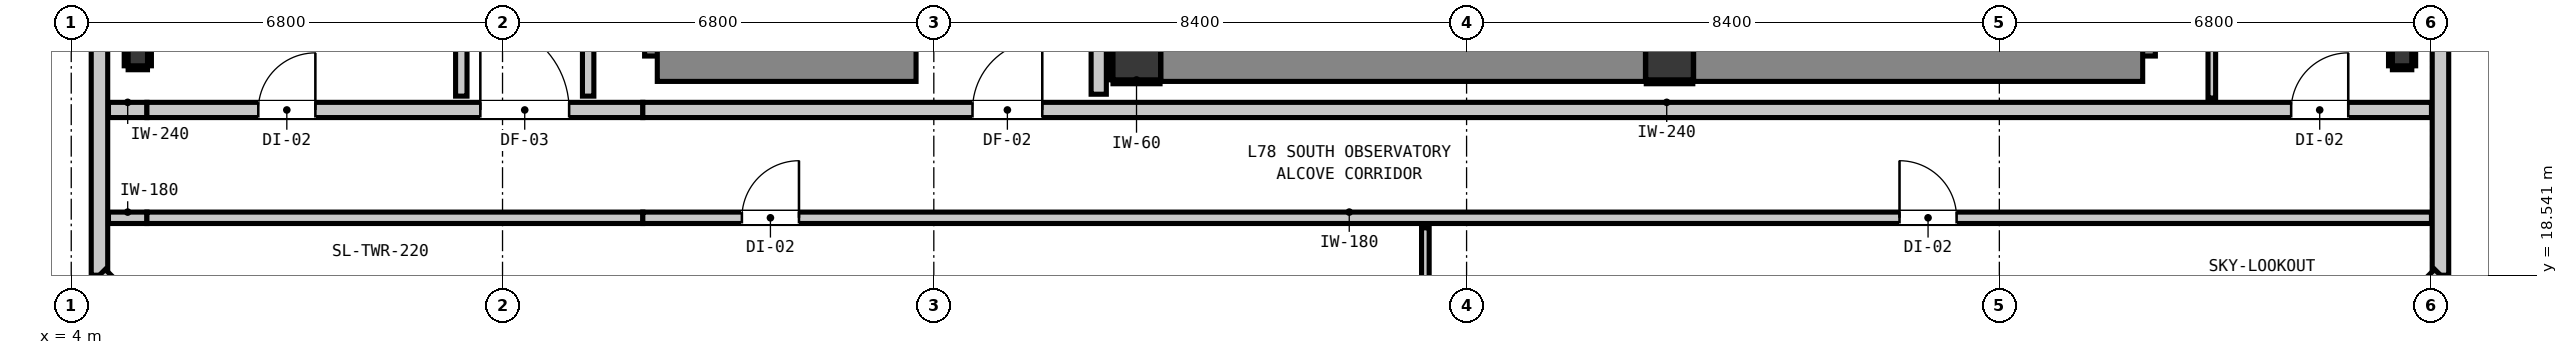
"""IFC4 building model, lengths in metres.
Left out: names, types, materials, properties, quantities, classifications, styles, units other than length and angle.
Written with IfcOpenShell. Run it as: python <this file> out.ifc"""

import sys

from ifc_helpers import new_model, si_unit, direction, frame, frame_2d, origin, origin_2d, place, context, subcontext, project, spatial, rectangle, i_section, extrude, element, fill, save


model = new_model("IFC4")
c1 = context("Model", 3, precision=1e-05, world=origin(), true_north=direction((0.0, 1.0)))
c2 = subcontext(c1, "Body", "Model", "MODEL_VIEW")
j1 = project(units=[si_unit("LENGTHUNIT", "METRE"), si_unit("PLANEANGLEUNIT", "RADIAN")], contexts=[c1])
p1 = place(None, origin())
s1 = spatial("IfcSite", under=j1, at=p1, CompositionType="ELEMENT")
p2 = place(p1, origin())
s2 = spatial("IfcBuilding", under=s1, at=p2, CompositionType="ELEMENT")
p3 = place(p2, frame((0.0, 0.0, 268.88)))
s3 = spatial("IfcBuildingStorey", under=s2, at=p3, CompositionType="ELEMENT", Elevation=268.88)
for number, where, z_axis, x_axis in (
    (1, (20.8, 22.0, 0.0), (0.0, 0.0, 1.0), (1.0, 0.0, 0.0)),
    (2, (29.2, 22.0, 0.0), (0.0, 0.0, 1.0), (1.0, 0.0, 0.0)),
):
    element("IfcColumn", number, at=place(p3, frame(where, z_axis=z_axis, x_axis=x_axis)), inside=s3, PredefinedType="COLUMN", context=c2, shape_type="SweptSolid", body=[
        extrude(rectangle(XDim=0.75, YDim=0.75, at=origin_2d()), origin(), (0.0, 0.0, 1.0), 4.6),
    ])
p4 = place(p3, frame((13.44, 22.0, 0.0), z_axis=(0.0, 0.0, 1.0), x_axis=(0.0, 1.0, 0.0)))
e3 = element("IfcWall", 3, at=p4, inside=s3, PredefinedType="SHEAR", context=c2, shape_type="SweptSolid", body=[
    extrude(rectangle(XDim=8.32, YDim=0.8, at=frame_2d((4.16, 0.0))), origin(), (0.0, 0.0, 1.0), 4.6),
])
p5 = place(p3, frame((13.24, 22.0, 0.0), z_axis=(0.0, 0.0, 1.0), x_axis=(1.0, 0.0, 0.0)))
e4 = element("IfcWall", 4, at=p5, inside=s3, PredefinedType="SHEAR", context=c2, shape_type="SweptSolid", body=[
    extrude(rectangle(XDim=4.08, YDim=0.8, at=frame_2d((2.04, 0.0))), origin(), (0.0, 0.0, 1.0), 4.6),
])
p6 = place(p3, frame((36.46, 22.0, 0.0), z_axis=(0.0, 0.0, 1.0), x_axis=(0.0, 1.0, 0.0)))
e5 = element("IfcWall", 5, at=p6, inside=s3, PredefinedType="SHEAR", context=c2, shape_type="SweptSolid", body=[
    extrude(rectangle(XDim=8.32, YDim=0.8, at=frame_2d((4.16, 0.0))), origin(), (0.0, 0.0, 1.0), 4.6),
])
p7 = place(p3, frame((29.58, 22.0, 0.0), z_axis=(0.0, 0.0, 1.0), x_axis=(1.0, 0.0, 0.0)))
e6 = element("IfcWall", 6, at=p7, inside=s3, PredefinedType="SHEAR", context=c2, shape_type="SweptSolid", body=[
    extrude(rectangle(XDim=7.08, YDim=0.8, at=frame_2d((3.54, 0.0))), origin(), (0.0, 0.0, 1.0), 4.6),
])
p8 = place(p3, frame((21.18, 22.0, 0.0), z_axis=(0.0, 0.0, 1.0), x_axis=(1.0, 0.0, 0.0)))
e7 = element("IfcWall", 7, at=p8, inside=s3, PredefinedType="SHEAR", context=c2, shape_type="SweptSolid", body=[
    extrude(rectangle(XDim=7.64, YDim=0.8, at=frame_2d((3.82, 0.0))), origin(), (0.0, 0.0, 1.0), 4.6),
])
for number, where, z_axis, x_axis in (
    (8, (5.05, 22.0, 0.0), (0.0, 0.0, 1.0), (1.0, 0.0, 0.0)),
    (9, (40.75, 22.0, 0.0), (0.0, 0.0, 1.0), (1.0, 0.0, 0.0)),
):
    element("IfcColumn", number, at=place(p3, frame(where, z_axis=z_axis, x_axis=x_axis)), inside=s3, PredefinedType="COLUMN", context=c2, shape_type="SweptSolid", body=[
        extrude(i_section(OverallWidth=0.305, OverallDepth=0.308, WebThickness=0.01, FlangeThickness=0.015, at=origin_2d()), origin(), (0.0, 0.0, 1.0), 4.6),
    ])
p9 = place(p3, frame((4.445, 18.545, 0.0), z_axis=(0.0, 0.0, 1.0), x_axis=(0.0, 1.0, 0.0)))
e10 = element("IfcWall", 10, at=p9, inside=s3, PredefinedType="STANDARD", context=c2, shape_type="SweptSolid", body=[
    extrude(rectangle(XDim=30.31, YDim=0.26, at=frame_2d((15.155, 0.0))), origin(), (0.0, 0.0, 1.0), 4.38),
])
p10 = place(p9, frame((26.038, 0.0, 0.85)))
e11 = element("IfcOpeningElement", 11, at=p10, cuts=e10, PredefinedType="OPENING", context=c2, shape_type="SweptSolid", body=[
    extrude(rectangle(XDim=1.65, YDim=1.75, at=frame_2d((0.825, 0.875))), frame((0.0, 0.14, 0.0), z_axis=(0.0, -1.0, 0.0), x_axis=(1.0, 0.0, 0.0)), (0.0, 0.0, 1.0), 0.28),
])
p11 = place(p3, frame((41.355, 48.855, 0.0), z_axis=(0.0, 0.0, 1.0), x_axis=(0.0, -1.0, 0.0)))
e12 = element("IfcWall", 12, at=p11, inside=s3, PredefinedType="STANDARD", context=c2, shape_type="SweptSolid", body=[
    extrude(rectangle(XDim=30.31, YDim=0.26, at=frame_2d((15.155, 0.0))), origin(), (0.0, 0.0, 1.0), 4.38),
])
p12 = place(p11, frame((2.622, 0.0, 0.85)))
e13 = element("IfcOpeningElement", 13, at=p12, cuts=e12, PredefinedType="OPENING", context=c2, shape_type="SweptSolid", body=[
    extrude(rectangle(XDim=1.65, YDim=1.75, at=frame_2d((0.825, 0.875))), frame((0.0, 0.14, 0.0), z_axis=(0.0, -1.0, 0.0), x_axis=(1.0, 0.0, 0.0)), (0.0, 0.0, 1.0), 0.28),
])
p13 = place(p11, frame((22.103, 0.0, 0.85)))
e14 = element("IfcOpeningElement", 14, at=p13, cuts=e12, PredefinedType="OPENING", context=c2, shape_type="SweptSolid", body=[
    extrude(rectangle(XDim=1.65, YDim=1.75, at=frame_2d((0.825, 0.875))), frame((0.0, 0.14, 0.0), z_axis=(0.0, -1.0, 0.0), x_axis=(1.0, 0.0, 0.0)), (0.0, 0.0, 1.0), 0.28),
])
p14 = place(p11, frame((12.98, 0.0, 0.85)))
e15 = element("IfcOpeningElement", 15, at=p14, cuts=e12, PredefinedType="OPENING", context=c2, shape_type="SweptSolid", body=[
    extrude(rectangle(XDim=1.65, YDim=1.75, at=frame_2d((0.825, 0.875))), frame((0.0, 0.14, 0.0), z_axis=(0.0, -1.0, 0.0), x_axis=(1.0, 0.0, 0.0)), (0.0, 0.0, 1.0), 0.28),
])
for number, where, z_axis, x_axis in (
    (16, (41.355, 18.545, 0.0), (0.0, 0.0, 1.0), (-0.707, -0.707, 0.0)),
    (17, (6.545, 16.445, 0.0), (0.0, 0.0, 1.0), (-0.707, 0.707, 0.0)),
):
    element("IfcWall", number, at=place(p3, frame(where, z_axis=z_axis, x_axis=x_axis)), inside=s3, PredefinedType="STANDARD", context=c2, shape_type="SweptSolid", body=[
        extrude(rectangle(XDim=2.97, YDim=0.26, at=frame_2d((1.485, 0.0))), origin(), (0.0, 0.0, 1.0), 4.38),
    ])
p15 = place(p3, frame((4.587, 21.15, 0.0), z_axis=(0.0, 0.0, 1.0), x_axis=(1.0, 0.0, 0.0)))
e18 = element("IfcWall", 18, at=p15, inside=s3, PredefinedType="PARTITIONING", context=c2, shape_type="SweptSolid", body=[
    extrude(rectangle(XDim=0.606, YDim=0.24, at=frame_2d((0.303, 0.0))), origin(), (0.0, 0.0, 1.0), 4.38),
])
p16 = place(p3, frame((5.193, 21.15, 0.0), z_axis=(0.0, 0.0, 1.0), x_axis=(1.0, 0.0, 0.0)))
e19 = element("IfcWall", 19, at=p16, inside=s3, PredefinedType="PARTITIONING", context=c2, shape_type="SweptSolid", body=[
    extrude(rectangle(XDim=7.819, YDim=0.24, at=frame_2d((3.909, 0.0))), origin(), (0.0, 0.0, 1.0), 3.757),
])
p17 = place(p16, frame((5.257, 0.0, 0.0)))
e20 = element("IfcOpeningElement", 20, at=p17, cuts=e19, PredefinedType="OPENING", context=c2, shape_type="SweptSolid", body=[
    extrude(rectangle(XDim=1.4, YDim=2.15, at=frame_2d((0.7, 1.075))), frame((0.0, 0.13, 0.0), z_axis=(0.0, -1.0, 0.0), x_axis=(1.0, 0.0, 0.0)), (0.0, 0.0, 1.0), 0.26),
])
p18 = place(p16, frame((1.756, 0.0, 0.0)))
e21 = element("IfcOpeningElement", 21, at=p18, cuts=e19, PredefinedType="OPENING", context=c2, shape_type="SweptSolid", body=[
    extrude(rectangle(XDim=0.9, YDim=2.1, at=frame_2d((0.45, 1.05))), frame((0.0, 0.13, 0.0), z_axis=(0.0, -1.0, 0.0), x_axis=(1.0, 0.0, 0.0)), (0.0, 0.0, 1.0), 0.26),
])
p19 = place(p3, frame((13.012, 21.15, 0.0), z_axis=(0.0, 0.0, 1.0), x_axis=(1.0, 0.0, 0.0)))
e22 = element("IfcWall", 22, at=p19, inside=s3, PredefinedType="PARTITIONING", context=c2, shape_type="SweptSolid", body=[
    extrude(rectangle(XDim=28.201, YDim=0.24, at=frame_2d((14.101, 0.0))), origin(), (0.0, 0.0, 1.0), 4.38),
])
p20 = place(p19, frame((5.198, 0.0, 0.0)))
e23 = element("IfcOpeningElement", 23, at=p20, cuts=e22, PredefinedType="OPENING", context=c2, shape_type="SweptSolid", body=[
    extrude(rectangle(XDim=1.1, YDim=2.15, at=frame_2d((0.55, 1.075))), frame((0.0, 0.13, 0.0), z_axis=(0.0, -1.0, 0.0), x_axis=(1.0, 0.0, 0.0)), (0.0, 0.0, 1.0), 0.26),
])
p21 = place(p19, frame((25.989, 0.0, 0.0)))
e24 = element("IfcOpeningElement", 24, at=p21, cuts=e22, PredefinedType="OPENING", context=c2, shape_type="SweptSolid", body=[
    extrude(rectangle(XDim=0.9, YDim=2.1, at=frame_2d((0.45, 1.05))), frame((0.0, 0.13, 0.0), z_axis=(0.0, -1.0, 0.0), x_axis=(1.0, 0.0, 0.0)), (0.0, 0.0, 1.0), 0.26),
])
p22 = place(p3, frame((4.587, 19.45, 0.0), z_axis=(0.0, 0.0, 1.0), x_axis=(1.0, 0.0, 0.0)))
e25 = element("IfcWall", 25, at=p22, inside=s3, PredefinedType="PARTITIONING", context=c2, shape_type="SweptSolid", body=[
    extrude(rectangle(XDim=0.606, YDim=0.18, at=frame_2d((0.303, 0.0))), origin(), (0.0, 0.0, 1.0), 4.38),
])
p23 = place(p3, frame((5.193, 19.45, 0.0), z_axis=(0.0, 0.0, 1.0), x_axis=(1.0, 0.0, 0.0)))
e26 = element("IfcWall", 26, at=p23, inside=s3, PredefinedType="PARTITIONING", context=c2, shape_type="SweptSolid", body=[
    extrude(rectangle(XDim=7.819, YDim=0.18, at=frame_2d((3.909, 0.0))), origin(), (0.0, 0.0, 1.0), 3.757),
])
p24 = place(p3, frame((13.012, 19.45, 0.0), z_axis=(0.0, 0.0, 1.0), x_axis=(1.0, 0.0, 0.0)))
e27 = element("IfcWall", 27, at=p24, inside=s3, PredefinedType="PARTITIONING", context=c2, shape_type="SweptSolid", body=[
    extrude(rectangle(XDim=28.201, YDim=0.18, at=frame_2d((14.101, 0.0))), origin(), (0.0, 0.0, 1.0), 4.38),
])
p25 = place(p24, frame((1.562, 0.0, 0.0)))
e28 = element("IfcOpeningElement", 28, at=p25, cuts=e27, PredefinedType="OPENING", context=c2, shape_type="SweptSolid", body=[
    extrude(rectangle(XDim=0.9, YDim=2.1, at=frame_2d((0.45, 1.05))), frame((0.0, 0.1, 0.0), z_axis=(0.0, -1.0, 0.0), x_axis=(1.0, 0.0, 0.0)), (0.0, 0.0, 1.0), 0.2),
])
p26 = place(p24, frame((19.814, 0.0, 0.0)))
e29 = element("IfcOpeningElement", 29, at=p26, cuts=e27, PredefinedType="OPENING", context=c2, shape_type="SweptSolid", body=[
    extrude(rectangle(XDim=0.9, YDim=2.1, at=frame_2d((0.45, 1.05))), frame((0.0, 0.1, 0.0), z_axis=(0.0, -1.0, 0.0), x_axis=(1.0, 0.0, 0.0)), (0.0, 0.0, 1.0), 0.2),
])
p27 = place(p3, frame((20.2, 21.398, 0.0), z_axis=(0.0, 0.0, 1.0), x_axis=(0.0, 1.0, 0.0)))
e30 = element("IfcWall", 30, at=p27, inside=s3, PredefinedType="PARTITIONING", context=c2, shape_type="SweptSolid", body=[
    extrude(rectangle(XDim=6.754, YDim=0.24, at=frame_2d((3.377, 0.0))), origin(), (0.0, 0.0, 1.0), 4.38),
])
p28 = place(p3, frame((10.15, 21.368, 0.0), z_axis=(0.0, 0.0, 1.0), x_axis=(0.0, 1.0, 0.0)))
e31 = element("IfcWall", 31, at=p28, inside=s3, PredefinedType="PARTITIONING", context=c2, shape_type="SweptSolid", body=[
    extrude(rectangle(XDim=6.064, YDim=0.18, at=frame_2d((3.032, 0.0))), origin(), (0.0, 0.0, 1.0), 4.38),
])
p29 = place(p3, frame((12.15, 21.368, 0.0), z_axis=(0.0, 0.0, 1.0), x_axis=(0.0, 1.0, 0.0)))
e32 = element("IfcWall", 32, at=p29, inside=s3, PredefinedType="PARTITIONING", context=c2, shape_type="SweptSolid", body=[
    extrude(rectangle(XDim=18.694, YDim=0.18, at=frame_2d((9.347, 0.0))), origin(), (0.0, 0.0, 1.0), 4.38),
])
p30 = place(p3, frame((25.35, 16.587, 0.0), z_axis=(0.0, 0.0, 1.0), x_axis=(0.0, 1.0, 0.0)))
e33 = element("IfcWall", 33, at=p30, inside=s3, PredefinedType="PARTITIONING", context=c2, shape_type="SweptSolid", body=[
    extrude(rectangle(XDim=2.705, YDim=0.12, at=frame_2d((1.353, 0.0))), origin(), (0.0, 0.0, 1.0), 4.38),
])
p31 = place(p3, frame((37.75, 21.338, 0.0), z_axis=(0.0, 0.0, 1.0), x_axis=(0.0, 1.0, 0.0)))
e34 = element("IfcWall", 34, at=p31, inside=s3, PredefinedType="PARTITIONING", context=c2, shape_type="SweptSolid", body=[
    extrude(rectangle(XDim=8.334, YDim=0.12, at=frame_2d((4.167, 0.0))), origin(), (0.0, 0.0, 1.0), 4.38),
])
p32 = place(p3, frame((20.425, 21.593, 0.0), z_axis=(0.0, 0.0, 1.0), x_axis=(1.0, 0.0, 0.0)))
e35 = element("IfcWall", 35, at=p32, inside=s3, PredefinedType="PARTITIONING", context=c2, shape_type="SweptSolid", body=[
    extrude(rectangle(XDim=0.742, YDim=0.06, at=frame_2d((0.371, 0.0))), origin(), (0.0, 0.0, 1.0), 1.45),
])
p33 = place(p3, frame((20.393, 21.625, 0.0), z_axis=(0.0, 0.0, 1.0), x_axis=(0.0, 1.0, 0.0)))
e36 = element("IfcWall", 36, at=p33, inside=s3, PredefinedType="PARTITIONING", context=c2, shape_type="SweptSolid", body=[
    extrude(rectangle(XDim=0.75, YDim=0.06, at=frame_2d((0.375, 0.0))), origin(), (0.0, 0.0, 1.0), 1.45),
])
p34 = place(p3, frame((28.833, 21.593, 0.0), z_axis=(0.0, 0.0, 1.0), x_axis=(1.0, 0.0, 0.0)))
e37 = element("IfcWall", 37, at=p34, inside=s3, PredefinedType="PARTITIONING", context=c2, shape_type="SweptSolid", body=[
    extrude(rectangle(XDim=0.734, YDim=0.06, at=frame_2d((0.367, 0.0))), origin(), (0.0, 0.0, 1.0), 1.45),
])
p35 = place(p3, frame((4.897, 21.814, 0.0), z_axis=(0.0, 0.0, 1.0), x_axis=(1.0, 0.0, 0.0)))
e38 = element("IfcWall", 38, at=p35, inside=s3, PredefinedType="PARTITIONING", context=c2, shape_type="SweptSolid", body=[
    extrude(rectangle(XDim=0.305, YDim=0.06, at=frame_2d((0.152, 0.0))), origin(), (0.0, 0.0, 1.0), 1.45),
])
for number, where, z_axis, x_axis in (
    (39, (4.865, 21.846, 0.0), (0.0, 0.0, 1.0), (0.0, 1.0, 0.0)),
    (40, (5.234, 21.846, 0.0), (0.0, 0.0, 1.0), (0.0, 1.0, 0.0)),
):
    element("IfcWall", number, at=place(p3, frame(where, z_axis=z_axis, x_axis=x_axis)), inside=s3, PredefinedType="PARTITIONING", context=c2, shape_type="SweptSolid", body=[
        extrude(rectangle(XDim=0.308, YDim=0.06, at=frame_2d((0.154, 0.0))), origin(), (0.0, 0.0, 1.0), 1.45),
    ])
p36 = place(p3, frame((40.597, 21.814, 0.0), z_axis=(0.0, 0.0, 1.0), x_axis=(1.0, 0.0, 0.0)))
e41 = element("IfcWall", 41, at=p36, inside=s3, PredefinedType="PARTITIONING", context=c2, shape_type="SweptSolid", body=[
    extrude(rectangle(XDim=0.306, YDim=0.06, at=frame_2d((0.153, 0.0))), origin(), (0.0, 0.0, 1.0), 1.45),
])
for number, where, z_axis, x_axis in (
    (42, (40.566, 21.846, 0.0), (0.0, 0.0, 1.0), (0.0, 1.0, 0.0)),
    (43, (40.934, 21.846, 0.0), (0.0, 0.0, 1.0), (0.0, 1.0, 0.0)),
):
    element("IfcWall", number, at=place(p3, frame(where, z_axis=z_axis, x_axis=x_axis)), inside=s3, PredefinedType="PARTITIONING", context=c2, shape_type="SweptSolid", body=[
        extrude(rectangle(XDim=0.308, YDim=0.06, at=frame_2d((0.154, 0.0))), origin(), (0.0, 0.0, 1.0), 1.45),
    ])
p37 = place(p20, origin())
e44 = element("IfcDoor", 44, at=p37, inside=s3, OperationType="SINGLE_SWING_RIGHT", PredefinedType="DOOR", context=c2, shape_type="SweptSolid", body=[
    extrude(rectangle(XDim=1.1, YDim=2.15, at=frame_2d((0.55, 1.075))), frame((0.0, 0.025, 0.0), z_axis=(0.0, -1.0, 0.0), x_axis=(1.0, 0.0, 0.0)), (0.0, 0.0, 1.0), 0.05),
])
fill(e23, e44)
p38 = place(p17, origin())
e45 = element("IfcDoor", 45, at=p38, inside=s3, OperationType="SINGLE_SWING_LEFT", PredefinedType="DOOR", context=c2, shape_type="SweptSolid", body=[
    extrude(rectangle(XDim=1.4, YDim=2.15, at=frame_2d((0.7, 1.075))), frame((0.0, 0.025, 0.0), z_axis=(0.0, -1.0, 0.0), x_axis=(1.0, 0.0, 0.0)), (0.0, 0.0, 1.0), 0.05),
])
fill(e20, e45)
p39 = place(p25, origin())
e46 = element("IfcDoor", 46, at=p39, inside=s3, OperationType="SINGLE_SWING_RIGHT", PredefinedType="DOOR", context=c2, shape_type="SweptSolid", body=[
    extrude(rectangle(XDim=0.9, YDim=2.1, at=frame_2d((0.45, 1.05))), frame((0.0, 0.025, 0.0), z_axis=(0.0, -1.0, 0.0), x_axis=(1.0, 0.0, 0.0)), (0.0, 0.0, 1.0), 0.05),
])
fill(e28, e46)
p40 = place(p26, origin())
e47 = element("IfcDoor", 47, at=p40, inside=s3, OperationType="SINGLE_SWING_LEFT", PredefinedType="DOOR", context=c2, shape_type="SweptSolid", body=[
    extrude(rectangle(XDim=0.9, YDim=2.1, at=frame_2d((0.45, 1.05))), frame((0.0, 0.025, 0.0), z_axis=(0.0, -1.0, 0.0), x_axis=(1.0, 0.0, 0.0)), (0.0, 0.0, 1.0), 0.05),
])
fill(e29, e47)
p41 = place(p18, origin())
e48 = element("IfcDoor", 48, at=p41, inside=s3, OperationType="SINGLE_SWING_RIGHT", PredefinedType="DOOR", context=c2, shape_type="SweptSolid", body=[
    extrude(rectangle(XDim=0.9, YDim=2.1, at=frame_2d((0.45, 1.05))), frame((0.0, 0.025, 0.0), z_axis=(0.0, -1.0, 0.0), x_axis=(1.0, 0.0, 0.0)), (0.0, 0.0, 1.0), 0.05),
])
fill(e21, e48)
p42 = place(p21, origin())
e49 = element("IfcDoor", 49, at=p42, inside=s3, OperationType="SINGLE_SWING_RIGHT", PredefinedType="DOOR", context=c2, shape_type="SweptSolid", body=[
    extrude(rectangle(XDim=0.9, YDim=2.1, at=frame_2d((0.45, 1.05))), frame((0.0, 0.025, 0.0), z_axis=(0.0, -1.0, 0.0), x_axis=(1.0, 0.0, 0.0)), (0.0, 0.0, 1.0), 0.05),
])
fill(e24, e49)
save(model, sys.argv[1])
